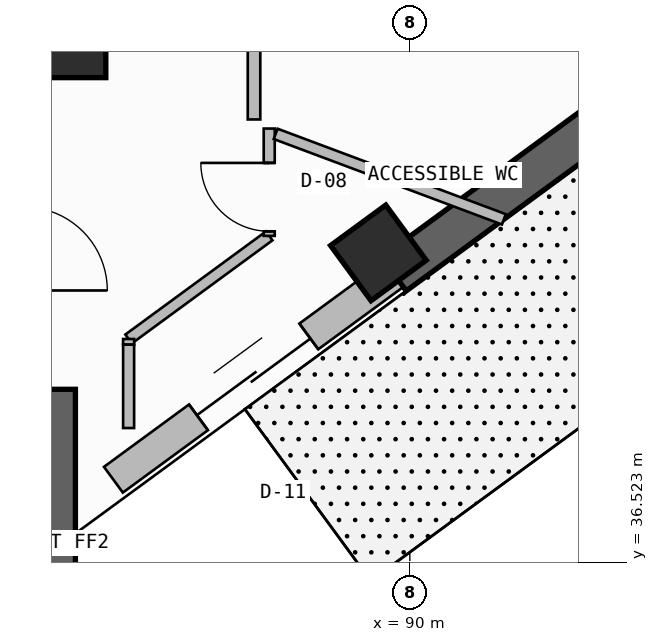
"""IFC4 building model, lengths in metres.
Left out: names, types, materials, properties, quantities, classifications, styles, units other than length and angle.
Written with IfcOpenShell. Run it as: python <this file> out.ifc"""

import sys

from ifc_helpers import new_model, si_unit, direction, frame, frame_2d, origin, origin_2d, place, context, subcontext, project, spatial, rectangle, extrude, element, fill, save


model = new_model("IFC4")
c1 = context("Model", 3, precision=1e-05, world=origin(), true_north=direction((0.0, 1.0)))
c2 = subcontext(c1, "Body", "Model", "MODEL_VIEW")
j1 = project(units=[si_unit("LENGTHUNIT", "METRE"), si_unit("PLANEANGLEUNIT", "RADIAN")], contexts=[c1])
p1 = place(None, origin())
s1 = spatial("IfcSite", under=j1, at=p1, CompositionType="ELEMENT")
p2 = place(p1, origin())
s2 = spatial("IfcBuilding", under=s1, at=p2, CompositionType="ELEMENT")
p3 = place(p2, frame((0.0, 0.0, 232.58)))
s3 = spatial("IfcBuildingStorey", under=s2, at=p3, CompositionType="ELEMENT", Elevation=232.58)
p4 = place(p3, frame((85.3, 35.5, -0.26), z_axis=(0.0, 0.0, 1.0), x_axis=(0.0, 1.0, 0.0)))
e1 = element("IfcWall", 1, at=p4, inside=s3, PredefinedType="SHEAR", context=c2, shape_type="SweptSolid", body=[
    extrude(rectangle(XDim=3.3, YDim=0.6, at=frame_2d((1.65, 0.0))), origin(), (0.0, 0.0, 1.0), 3.52),
])
for number, where, z_axis, x_axis in (
    (2, (85.55, 43.35, 0.0), (0.0, 0.0, 1.0), (1.0, 0.0, 0.0)),
    (3, (89.586, 40.594, 0.0), (0.0, 0.0, 1.0), (0.806, 0.591, 0.0)),
):
    element("IfcColumn", number, at=place(p3, frame(where, z_axis=z_axis, x_axis=x_axis)), inside=s3, PredefinedType="COLUMN", context=c2, shape_type="SweptSolid", body=[
        extrude(rectangle(XDim=0.9, YDim=0.9, at=origin_2d()), origin(), (0.0, 0.0, 1.0), 3.52),
    ])
p5 = place(p3, frame((86.1, 37.61, 0.0), z_axis=(0.0, 0.0, 1.0), x_axis=(0.806432132361, 0.591326657521, 0.0)))
e4 = element("IfcWall", 4, at=p5, inside=s3, PredefinedType="SOLIDWALL", context=c2, shape_type="SweptSolid", body=[
    extrude(rectangle(XDim=4.576, YDim=0.42, at=frame_2d((2.288, 0.0))), origin(), (0.0, 0.0, 1.0), 2.645),
])
p6 = place(p5, frame((1.388, 0.0, 0.0)))
e5 = element("IfcOpeningElement", 5, at=p6, cuts=e4, PredefinedType="OPENING", context=c2, shape_type="SweptSolid", body=[
    extrude(rectangle(XDim=1.8, YDim=2.35, at=frame_2d((0.9, 1.175))), frame((0.0, 0.22, 0.0), z_axis=(0.0, -1.0, 0.0), x_axis=(1.0, 0.0, 0.0)), (0.0, 0.0, 1.0), 0.44),
])
p7 = place(p3, frame((89.791, 40.316, -0.26), z_axis=(0.0, 0.0, 1.0), x_axis=(0.806449218078, 0.591303355868, 0.0)))
e6 = element("IfcWall", 6, at=p7, inside=s3, PredefinedType="SHEAR", context=c2, shape_type="SweptSolid", body=[
    extrude(rectangle(XDim=16.673, YDim=0.55, at=frame_2d((8.336, 0.0))), origin(), (0.0, 0.0, 1.0), 3.52),
])
p8 = place(p7, frame((4.054, 0.0, 1.1)))
e7 = element("IfcOpeningElement", 7, at=p8, cuts=e6, PredefinedType="OPENING", context=c2, shape_type="SweptSolid", body=[
    extrude(rectangle(XDim=2.4, YDim=1.2, at=frame_2d((1.2, 0.6))), frame((0.0, 0.285, 0.0), z_axis=(0.0, -1.0, 0.0), x_axis=(1.0, 0.0, 0.0)), (0.0, 0.0, 1.0), 0.57),
])
p9 = place(p3, frame((86.3, 39.462, 0.0), z_axis=(0.0, 0.0, 1.0), x_axis=(0.80642868075, 0.591331364689, 0.0)))
e8 = element("IfcWall", 8, at=p9, inside=s3, PredefinedType="PARTITIONING", context=c2, shape_type="SweptSolid", body=[
    extrude(rectangle(XDim=2.294, YDim=0.145, at=frame_2d((1.147, 0.0))), origin(), (0.0, 0.0, 1.0), 3.26),
])
p10 = place(p3, frame((88.15, 40.818, 0.0), z_axis=(0.0, 0.0, 1.0), x_axis=(0.0, 1.0, 0.0)))
e9 = element("IfcWall", 9, at=p10, inside=s3, PredefinedType="PARTITIONING", context=c2, shape_type="SweptSolid", body=[
    extrude(rectangle(XDim=1.412, YDim=0.145, at=frame_2d((0.706, 0.0))), origin(), (0.0, 0.0, 1.0), 2.745),
])
p11 = place(p10, frame((0.06, 0.0, 0.0)))
e10 = element("IfcOpeningElement", 10, at=p11, cuts=e9, PredefinedType="OPENING", context=c2, shape_type="SweptSolid", body=[
    extrude(rectangle(XDim=0.9, YDim=2.1, at=frame_2d((0.45, 1.05))), frame((0.0, 0.083, 0.0), z_axis=(0.0, -1.0, 0.0), x_axis=(1.0, 0.0, 0.0)), (0.0, 0.0, 1.0), 0.165),
])
p12 = place(p3, frame((86.3, 39.388, 0.0), z_axis=(0.0, 0.0, 1.0), x_axis=(0.0, 1.0, 0.0)))
e11 = element("IfcWall", 11, at=p12, inside=s3, PredefinedType="PARTITIONING", context=c2, shape_type="SweptSolid", body=[
    extrude(rectangle(XDim=0.074, YDim=0.145, at=frame_2d((0.037, 0.0))), origin(), (0.0, 0.0, 1.0), 3.26),
])
p13 = place(p3, frame((88.235, 42.16, 0.0), z_axis=(0.0, 0.0, 1.0), x_axis=(0.936507423825, -0.35064775077, 0.0)))
e12 = element("IfcWall", 12, at=p13, inside=s3, PredefinedType="PARTITIONING", context=c2, shape_type="SweptSolid", body=[
    extrude(rectangle(XDim=3.206, YDim=0.145, at=frame_2d((1.603, 0.0))), origin(), (0.0, 0.0, 1.0), 2.645),
])
p14 = place(p3, frame((87.95, 42.35, 0.0), z_axis=(0.0, 0.0, 1.0), x_axis=(0.0, 1.0, 0.0)))
e13 = element("IfcWall", 13, at=p14, inside=s3, PredefinedType="PARTITIONING", context=c2, shape_type="SweptSolid", body=[
    extrude(rectangle(XDim=3.3, YDim=0.165, at=frame_2d((1.65, 0.0))), origin(), (0.0, 0.0, 1.0), 2.745),
])
p15 = place(p3, frame((86.3, 38.29, 0.0), z_axis=(0.0, 0.0, 1.0), x_axis=(0.0, 1.0, 0.0)))
e14 = element("IfcWall", 14, at=p15, inside=s3, PredefinedType="PARTITIONING", context=c2, shape_type="SweptSolid", body=[
    extrude(rectangle(XDim=1.097, YDim=0.145, at=frame_2d((0.549, 0.0))), origin(), (0.0, 0.0, 1.0), 3.26),
])
p16 = place(p6, origin())
e15 = element("IfcDoor", 15, at=p16, inside=s3, OperationType="DOUBLE_DOOR_SLIDING", PredefinedType="DOOR", context=c2, shape_type="SweptSolid", body=[
    extrude(rectangle(XDim=1.8, YDim=2.35, at=frame_2d((0.9, 1.175))), frame((0.0, 0.025, 0.0), z_axis=(0.0, -1.0, 0.0), x_axis=(1.0, 0.0, 0.0)), (0.0, 0.0, 1.0), 0.05),
])
fill(e5, e15)
p17 = place(p11, origin())
e16 = element("IfcDoor", 16, at=p17, inside=s3, OperationType="SINGLE_SWING_RIGHT", PredefinedType="DOOR", context=c2, shape_type="SweptSolid", body=[
    extrude(rectangle(XDim=0.9, YDim=2.1, at=frame_2d((0.45, 1.05))), frame((0.0, 0.025, 0.0), z_axis=(0.0, -1.0, 0.0), x_axis=(1.0, 0.0, 0.0)), (0.0, 0.0, 1.0), 0.05),
])
fill(e10, e16)
save(model, sys.argv[1])
